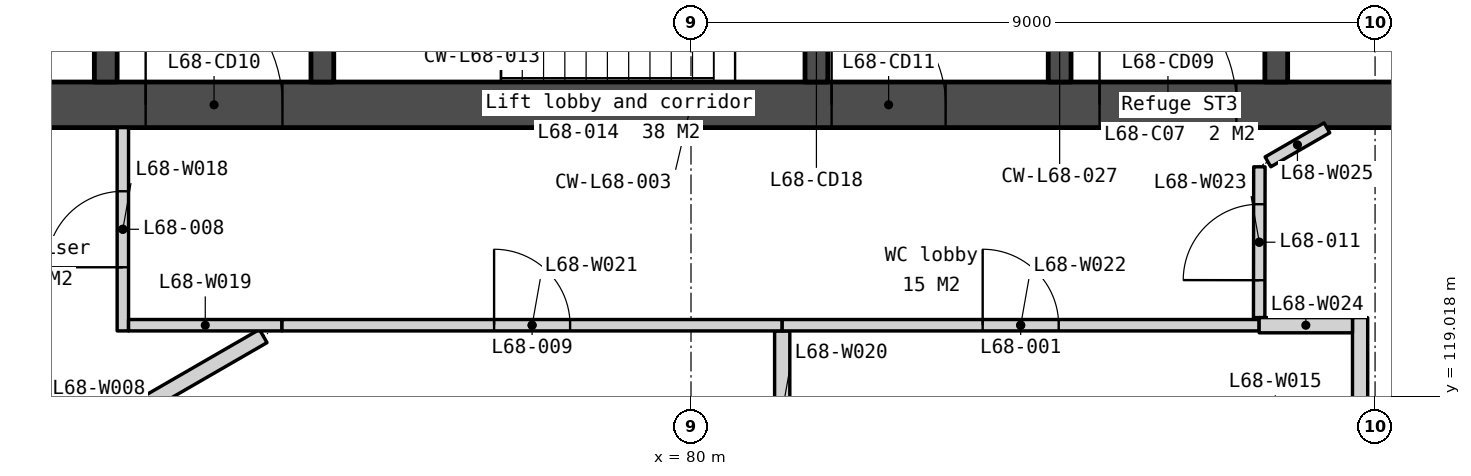
"""IFC4 building model, lengths in metres.
Left out: names, types, materials, properties, quantities, classifications, styles, units other than length and angle.
Written with IfcOpenShell. Run it as: python <this file> out.ifc"""

import sys

from ifc_helpers import new_model, si_unit, direction, frame, frame_2d, origin, place, context, subcontext, project, spatial, polyline, rectangle, outline, extrude, element, fill, save


model = new_model("IFC4")
c1 = context("Model", 3, precision=1e-05, world=origin(), true_north=direction((0.0, 1.0)))
c2 = subcontext(c1, "Body", "Model", "MODEL_VIEW")
j1 = project(units=[si_unit("LENGTHUNIT", "METRE"), si_unit("PLANEANGLEUNIT", "RADIAN")], contexts=[c1])
p1 = place(None, origin())
s1 = spatial("IfcSite", under=j1, at=p1, CompositionType="ELEMENT")
p2 = place(p1, origin())
s2 = spatial("IfcBuilding", under=s1, at=p2, CompositionType="ELEMENT")
p3 = place(p2, frame((0.0, 0.0, 277.7)))
s3 = spatial("IfcBuildingStorey", under=s2, at=p3, CompositionType="ELEMENT", Elevation=277.7)
p4 = place(p3, frame((69.0, 122.85, 0.0), z_axis=(0.0, 0.0, 1.0), x_axis=(1.0, 0.0, 0.0)))
e1 = element("IfcWall", 1, at=p4, inside=s3, PredefinedType="SOLIDWALL", context=c2, shape_type="SweptSolid", body=[
    extrude(rectangle(XDim=22.0, YDim=0.6, at=frame_2d((11.0, 0.0))), origin(), (0.0, 0.0, 1.0), 3.75),
])
p5 = place(p4, frame((16.375, 0.0, 0.0)))
e2 = element("IfcOpeningElement", 2, at=p5, cuts=e1, PredefinedType="OPENING", context=c2, shape_type="SweptSolid", body=[
    extrude(rectangle(XDim=1.8, YDim=2.1, at=frame_2d((0.9, 1.05))), frame((0.0, 0.31, 0.0), z_axis=(0.0, -1.0, 0.0), x_axis=(1.0, 0.0, 0.0)), (0.0, 0.0, 1.0), 0.62),
])
p6 = place(p4, frame((3.825, 0.0, 0.0)))
e3 = element("IfcOpeningElement", 3, at=p6, cuts=e1, PredefinedType="OPENING", context=c2, shape_type="SweptSolid", body=[
    extrude(rectangle(XDim=1.8, YDim=2.1, at=frame_2d((0.9, 1.05))), frame((0.0, 0.31, 0.0), z_axis=(0.0, -1.0, 0.0), x_axis=(1.0, 0.0, 0.0)), (0.0, 0.0, 1.0), 0.62),
])
p7 = place(p4, frame((12.85, 0.0, 0.0)))
e4 = element("IfcOpeningElement", 4, at=p7, cuts=e1, PredefinedType="OPENING", context=c2, shape_type="SweptSolid", body=[
    extrude(rectangle(XDim=1.5, YDim=2.1, at=frame_2d((0.75, 1.05))), frame((0.0, 0.31, 0.0), z_axis=(0.0, -1.0, 0.0), x_axis=(1.0, 0.0, 0.0)), (0.0, 0.0, 1.0), 0.62),
])
p8 = place(p3, frame((72.3, 133.95, 0.0), z_axis=(0.0, 0.0, 1.0), x_axis=(0.0, -1.0, 0.0)))
e5 = element("IfcWall", 5, at=p8, inside=s3, PredefinedType="SOLIDWALL", context=c2, shape_type="SweptSolid", body=[
    extrude(rectangle(XDim=10.8, YDim=0.3, at=frame_2d((5.4, 0.0))), origin(), (0.0, 0.0, 1.0), 3.75),
])
p9 = place(p8, frame((6.95, 0.0, 0.0)))
e6 = element("IfcOpeningElement", 6, at=p9, cuts=e5, PredefinedType="OPENING", context=c2, shape_type="SweptSolid", body=[
    extrude(rectangle(XDim=1.1, YDim=2.1, at=frame_2d((0.55, 1.05))), frame((0.0, 0.16, 0.0), z_axis=(0.0, -1.0, 0.0), x_axis=(1.0, 0.0, 0.0)), (0.0, 0.0, 1.0), 0.32),
])
p10 = place(p8, frame((9.35, 0.0, 0.0)))
e7 = element("IfcOpeningElement", 7, at=p10, cuts=e5, PredefinedType="OPENING", context=c2, shape_type="SweptSolid", body=[
    extrude(rectangle(XDim=0.9, YDim=2.1, at=frame_2d((0.45, 1.05))), frame((0.0, 0.16, 0.0), z_axis=(0.0, -1.0, 0.0), x_axis=(1.0, 0.0, 0.0)), (0.0, 0.0, 1.0), 0.32),
])
p11 = place(p8, frame((5.1, 0.0, 0.0)))
e8 = element("IfcOpeningElement", 8, at=p11, cuts=e5, PredefinedType="OPENING", context=c2, shape_type="SweptSolid", body=[
    extrude(rectangle(XDim=1.0, YDim=2.1, at=frame_2d((0.5, 1.05))), frame((0.0, 0.16, 0.0), z_axis=(0.0, -1.0, 0.0), x_axis=(1.0, 0.0, 0.0)), (0.0, 0.0, 1.0), 0.32),
])
p12 = place(p3, frame((75.15, 125.7, 0.0), z_axis=(0.0, 0.0, 1.0), x_axis=(0.0, -1.0, 0.0)))
e9 = element("IfcWall", 9, at=p12, inside=s3, PredefinedType="SOLIDWALL", context=c2, shape_type="SweptSolid", body=[
    extrude(rectangle(XDim=2.55, YDim=0.3, at=frame_2d((1.275, 0.0))), origin(), (0.0, 0.0, 1.0), 3.75),
])
p13 = place(p3, frame((81.65, 125.7, 0.0), z_axis=(0.0, 0.0, 1.0), x_axis=(0.0, -1.0, 0.0)))
e10 = element("IfcWall", 10, at=p13, inside=s3, PredefinedType="SOLIDWALL", context=c2, shape_type="SweptSolid", body=[
    extrude(rectangle(XDim=2.55, YDim=0.3, at=frame_2d((1.275, 0.0))), origin(), (0.0, 0.0, 1.0), 3.75),
])
p14 = place(p13, frame((0.75, 0.0, 0.0)))
e11 = element("IfcOpeningElement", 11, at=p14, cuts=e10, PredefinedType="OPENING", context=c2, shape_type="SweptSolid", body=[
    extrude(rectangle(XDim=1.0, YDim=2.1, at=frame_2d((0.5, 1.05))), frame((0.0, 0.16, 0.0), z_axis=(0.0, -1.0, 0.0), x_axis=(1.0, 0.0, 0.0)), (0.0, 0.0, 1.0), 0.32),
])
p15 = place(p3, frame((84.85, 125.85, 0.0), z_axis=(0.0, 0.0, 1.0), x_axis=(0.0, -1.0, 0.0)))
e12 = element("IfcWall", 12, at=p15, inside=s3, PredefinedType="SOLIDWALL", context=c2, shape_type="SweptSolid", body=[
    extrude(rectangle(XDim=2.7, YDim=0.3, at=frame_2d((1.35, 0.0))), origin(), (0.0, 0.0, 1.0), 3.75),
])
p16 = place(p3, frame((87.7, 133.95, 0.0), z_axis=(0.0, 0.0, 1.0), x_axis=(0.0, -1.0, 0.0)))
e13 = element("IfcWall", 13, at=p16, inside=s3, PredefinedType="SOLIDWALL", context=c2, shape_type="SweptSolid", body=[
    extrude(rectangle(XDim=10.8, YDim=0.3, at=frame_2d((5.4, 0.0))), origin(), (0.0, 0.0, 1.0), 3.75),
])
p17 = place(p16, frame((6.95, 0.0, 0.0)))
e14 = element("IfcOpeningElement", 14, at=p17, cuts=e13, PredefinedType="OPENING", context=c2, shape_type="SweptSolid", body=[
    extrude(rectangle(XDim=1.1, YDim=2.1, at=frame_2d((0.55, 1.05))), frame((0.0, 0.16, 0.0), z_axis=(0.0, -1.0, 0.0), x_axis=(1.0, 0.0, 0.0)), (0.0, 0.0, 1.0), 0.32),
])
p18 = place(p16, frame((5.1, 0.0, 0.0)))
e15 = element("IfcOpeningElement", 15, at=p18, cuts=e13, PredefinedType="OPENING", context=c2, shape_type="SweptSolid", body=[
    extrude(rectangle(XDim=1.0, YDim=2.1, at=frame_2d((0.5, 1.05))), frame((0.0, 0.16, 0.0), z_axis=(0.0, -1.0, 0.0), x_axis=(1.0, 0.0, 0.0)), (0.0, 0.0, 1.0), 0.32),
])
p19 = place(p16, frame((9.25, 0.0, 0.0)))
e16 = element("IfcOpeningElement", 16, at=p19, cuts=e13, PredefinedType="OPENING", context=c2, shape_type="SweptSolid", body=[
    extrude(rectangle(XDim=1.1, YDim=2.1, at=frame_2d((0.55, 1.05))), frame((0.0, 0.16, 0.0), z_axis=(0.0, -1.0, 0.0), x_axis=(1.0, 0.0, 0.0)), (0.0, 0.0, 1.0), 0.32),
])
p20 = place(p3, frame((60.609, 133.207, -0.15), z_axis=(0.0, 0.0, 1.0), x_axis=(0.500002536638, -0.866023939251, 0.0)))
e17 = element("IfcWall", 17, at=p20, inside=s3, PredefinedType="SOLIDWALL", context=c2, shape_type="SweptSolid", body=[
    extrude(outline(polyline([(36.972, 0.0), (36.972, 3.9), (0.0, 3.9), (0.0, 0.0), (36.972, 0.0)])), frame((0.0, 0.225, 0.0), z_axis=(0.0, -1.0, 0.0), x_axis=(1.0, 0.0, 0.0)), (0.0, 0.0, 1.0), 0.45),
])
p21 = place(p20, frame((0.744, 0.0, 0.95)))
e18 = element("IfcOpeningElement", 18, at=p21, cuts=e17, PredefinedType="OPENING", context=c2, shape_type="SweptSolid", body=[
    extrude(rectangle(XDim=1.2, YDim=2.2, at=frame_2d((0.6, 1.1))), frame((0.0, 0.235, 0.0), z_axis=(0.0, -1.0, 0.0), x_axis=(1.0, 0.0, 0.0)), (0.0, 0.0, 1.0), 0.47),
])
p22 = place(p20, frame((7.793, 0.0, 0.95)))
e19 = element("IfcOpeningElement", 19, at=p22, cuts=e17, PredefinedType="OPENING", context=c2, shape_type="SweptSolid", body=[
    extrude(rectangle(XDim=1.2, YDim=2.2, at=frame_2d((0.6, 1.1))), frame((0.0, 0.235, 0.0), z_axis=(0.0, -1.0, 0.0), x_axis=(1.0, 0.0, 0.0)), (0.0, 0.0, 1.0), 0.47),
])
p23 = place(p20, frame((9.493, 0.0, 0.95)))
e20 = element("IfcOpeningElement", 20, at=p23, cuts=e17, PredefinedType="OPENING", context=c2, shape_type="SweptSolid", body=[
    extrude(rectangle(XDim=1.2, YDim=2.2, at=frame_2d((0.6, 1.1))), frame((0.0, 0.235, 0.0), z_axis=(0.0, -1.0, 0.0), x_axis=(1.0, 0.0, 0.0)), (0.0, 0.0, 1.0), 0.47),
])
p24 = place(p20, frame((17.036, 0.0, 0.95)))
e21 = element("IfcOpeningElement", 21, at=p24, cuts=e17, PredefinedType="OPENING", context=c2, shape_type="SweptSolid", body=[
    extrude(rectangle(XDim=1.2, YDim=2.2, at=frame_2d((0.6, 1.1))), frame((0.0, 0.235, 0.0), z_axis=(0.0, -1.0, 0.0), x_axis=(1.0, 0.0, 0.0)), (0.0, 0.0, 1.0), 0.47),
])
p25 = place(p20, frame((18.736, 0.0, 0.95)))
e22 = element("IfcOpeningElement", 22, at=p25, cuts=e17, PredefinedType="OPENING", context=c2, shape_type="SweptSolid", body=[
    extrude(rectangle(XDim=1.2, YDim=2.2, at=frame_2d((0.6, 1.1))), frame((0.0, 0.235, 0.0), z_axis=(0.0, -1.0, 0.0), x_axis=(1.0, 0.0, 0.0)), (0.0, 0.0, 1.0), 0.47),
])
p26 = place(p20, frame((26.279, 0.0, 0.95)))
e23 = element("IfcOpeningElement", 23, at=p26, cuts=e17, PredefinedType="OPENING", context=c2, shape_type="SweptSolid", body=[
    extrude(rectangle(XDim=1.2, YDim=2.2, at=frame_2d((0.6, 1.1))), frame((0.0, 0.235, 0.0), z_axis=(0.0, -1.0, 0.0), x_axis=(1.0, 0.0, 0.0)), (0.0, 0.0, 1.0), 0.47),
])
p27 = place(p20, frame((27.979, 0.0, 0.95)))
e24 = element("IfcOpeningElement", 24, at=p27, cuts=e17, PredefinedType="OPENING", context=c2, shape_type="SweptSolid", body=[
    extrude(rectangle(XDim=1.2, YDim=2.2, at=frame_2d((0.6, 1.1))), frame((0.0, 0.235, 0.0), z_axis=(0.0, -1.0, 0.0), x_axis=(1.0, 0.0, 0.0)), (0.0, 0.0, 1.0), 0.47),
])
p28 = place(p20, frame((35.028, 0.0, 0.95)))
e25 = element("IfcOpeningElement", 25, at=p28, cuts=e17, PredefinedType="OPENING", context=c2, shape_type="SweptSolid", body=[
    extrude(rectangle(XDim=1.2, YDim=2.2, at=frame_2d((0.6, 1.1))), frame((0.0, 0.235, 0.0), z_axis=(0.0, -1.0, 0.0), x_axis=(1.0, 0.0, 0.0)), (0.0, 0.0, 1.0), 0.47),
])
p29 = place(p3, frame((86.427, 110.752, -0.15), z_axis=(0.0, 0.0, 1.0), x_axis=(0.500000383388, 0.866025182435, 0.0)))
e26 = element("IfcWall", 26, at=p29, inside=s3, PredefinedType="SOLIDWALL", context=c2, shape_type="SweptSolid", body=[
    extrude(outline(polyline([(25.929, 3.9), (25.929, 0.0), (0.0, 0.0), (0.0, 3.9), (25.929, 3.9)])), frame((0.0, 0.225, 0.0), z_axis=(0.0, -1.0, 0.0), x_axis=(1.0, 0.0, 0.0)), (0.0, 0.0, 1.0), 0.45),
])
p30 = place(p29, frame((5.993, 0.0, 0.95)))
e27 = element("IfcOpeningElement", 27, at=p30, cuts=e26, PredefinedType="OPENING", context=c2, shape_type="SweptSolid", body=[
    extrude(rectangle(XDim=1.2, YDim=2.2, at=frame_2d((0.6, 1.1))), frame((0.0, 0.235, 0.0), z_axis=(0.0, -1.0, 0.0), x_axis=(1.0, 0.0, 0.0)), (0.0, 0.0, 1.0), 0.47),
])
p31 = place(p29, frame((7.693, 0.0, 0.95)))
e28 = element("IfcOpeningElement", 28, at=p31, cuts=e26, PredefinedType="OPENING", context=c2, shape_type="SweptSolid", body=[
    extrude(rectangle(XDim=1.2, YDim=2.2, at=frame_2d((0.6, 1.1))), frame((0.0, 0.235, 0.0), z_axis=(0.0, -1.0, 0.0), x_axis=(1.0, 0.0, 0.0)), (0.0, 0.0, 1.0), 0.47),
])
p32 = place(p29, frame((15.236, 0.0, 0.95)))
e29 = element("IfcOpeningElement", 29, at=p32, cuts=e26, PredefinedType="OPENING", context=c2, shape_type="SweptSolid", body=[
    extrude(rectangle(XDim=1.2, YDim=2.2, at=frame_2d((0.6, 1.1))), frame((0.0, 0.235, 0.0), z_axis=(0.0, -1.0, 0.0), x_axis=(1.0, 0.0, 0.0)), (0.0, 0.0, 1.0), 0.47),
])
p33 = place(p29, frame((16.936, 0.0, 0.95)))
e30 = element("IfcOpeningElement", 30, at=p33, cuts=e26, PredefinedType="OPENING", context=c2, shape_type="SweptSolid", body=[
    extrude(rectangle(XDim=1.2, YDim=2.2, at=frame_2d((0.6, 1.1))), frame((0.0, 0.235, 0.0), z_axis=(0.0, -1.0, 0.0), x_axis=(1.0, 0.0, 0.0)), (0.0, 0.0, 1.0), 0.47),
])
p34 = place(p29, frame((23.985, 0.0, 0.95)))
e31 = element("IfcOpeningElement", 31, at=p34, cuts=e26, PredefinedType="OPENING", context=c2, shape_type="SweptSolid", body=[
    extrude(rectangle(XDim=1.2, YDim=2.2, at=frame_2d((0.6, 1.1))), frame((0.0, 0.235, 0.0), z_axis=(0.0, -1.0, 0.0), x_axis=(1.0, 0.0, 0.0)), (0.0, 0.0, 1.0), 0.47),
])
p35 = place(p3, frame((70.047, 117.31, 0.0), z_axis=(0.0, 0.0, 1.0), x_axis=(0.866032544947, 0.499987630939, 0.0)))
e32 = element("IfcWall", 32, at=p35, inside=s3, PredefinedType="PARTITIONING", context=c2, shape_type="SweptSolid", body=[
    extrude(rectangle(XDim=4.994, YDim=0.2, at=frame_2d((2.497, 0.0))), origin(), (0.0, 0.0, 1.0), 3.75),
])
p36 = place(p3, frame((88.803, 120.05, 0.0), z_axis=(0.0, 0.0, 1.0), x_axis=(0.0, -1.0, 0.0)))
e33 = element("IfcWall", 33, at=p36, inside=s3, PredefinedType="PARTITIONING", context=c2, shape_type="SweptSolid", body=[
    extrude(rectangle(XDim=2.3, YDim=0.2, at=frame_2d((1.15, 0.0))), origin(), (0.0, 0.0, 1.0), 3.062),
])
p37 = place(p3, frame((72.525, 119.875, 0.0), z_axis=(0.0, 0.0, 1.0), x_axis=(0.0, 1.0, 0.0)))
e34 = element("IfcWall", 34, at=p37, inside=s3, PredefinedType="PARTITIONING", context=c2, shape_type="SweptSolid", body=[
    extrude(rectangle(XDim=2.675, YDim=0.15, at=frame_2d((1.337, 0.0))), origin(), (0.0, 0.0, 1.0), 3.75),
])
p38 = place(p37, frame((0.837, 0.0, 0.0)))
e35 = element("IfcOpeningElement", 35, at=p38, cuts=e34, PredefinedType="OPENING", context=c2, shape_type="SweptSolid", body=[
    extrude(rectangle(XDim=1.0, YDim=2.1, at=frame_2d((0.5, 1.05))), frame((0.0, 0.085, 0.0), z_axis=(0.0, -1.0, 0.0), x_axis=(1.0, 0.0, 0.0)), (0.0, 0.0, 1.0), 0.17),
])
p39 = place(p3, frame((72.6, 119.95, 0.0), z_axis=(0.0, 0.0, 1.0), x_axis=(1.0, 0.0, 0.0)))
e36 = element("IfcWall", 36, at=p39, inside=s3, PredefinedType="PARTITIONING", context=c2, shape_type="SweptSolid", body=[
    extrude(rectangle(XDim=2.019, YDim=0.15, at=frame_2d((1.009, 0.0))), origin(), (0.0, 0.0, 1.0), 3.75),
])
p40 = place(p3, frame((81.2, 117.75, 0.0), z_axis=(0.0, 0.0, 1.0), x_axis=(0.0, 1.0, 0.0)))
e37 = element("IfcWall", 37, at=p40, inside=s3, PredefinedType="PARTITIONING", context=c2, shape_type="SweptSolid", body=[
    extrude(rectangle(XDim=2.125, YDim=0.2, at=frame_2d((1.062, 0.0))), origin(), (0.0, 0.0, 1.0), 3.75),
])
p41 = place(p3, frame((74.619, 119.95, 0.0), z_axis=(0.0, 0.0, 1.0), x_axis=(1.0, 0.0, 0.0)))
e38 = element("IfcWall", 38, at=p41, inside=s3, PredefinedType="PARTITIONING", context=c2, shape_type="SweptSolid", body=[
    extrude(rectangle(XDim=6.581, YDim=0.15, at=frame_2d((3.291, 0.0))), origin(), (0.0, 0.0, 1.0), 3.75),
])
p42 = place(p41, frame((2.791, 0.0, 0.0)))
e39 = element("IfcOpeningElement", 39, at=p42, cuts=e38, PredefinedType="OPENING", context=c2, shape_type="SweptSolid", body=[
    extrude(rectangle(XDim=1.0, YDim=2.1, at=frame_2d((0.5, 1.05))), frame((0.0, 0.085, 0.0), z_axis=(0.0, -1.0, 0.0), x_axis=(1.0, 0.0, 0.0)), (0.0, 0.0, 1.0), 0.17),
])
p43 = place(p3, frame((81.2, 119.95, 0.0), z_axis=(0.0, 0.0, 1.0), x_axis=(1.0, 0.0, 0.0)))
e40 = element("IfcWall", 40, at=p43, inside=s3, PredefinedType="PARTITIONING", context=c2, shape_type="SweptSolid", body=[
    extrude(rectangle(XDim=6.275, YDim=0.15, at=frame_2d((3.137, 0.0))), origin(), (0.0, 0.0, 1.0), 3.75),
])
p44 = place(p43, frame((2.637, 0.0, 0.0)))
e41 = element("IfcOpeningElement", 41, at=p44, cuts=e40, PredefinedType="OPENING", context=c2, shape_type="SweptSolid", body=[
    extrude(rectangle(XDim=1.0, YDim=2.1, at=frame_2d((0.5, 1.05))), frame((0.0, 0.085, 0.0), z_axis=(0.0, -1.0, 0.0), x_axis=(1.0, 0.0, 0.0)), (0.0, 0.0, 1.0), 0.17),
])
p45 = place(p3, frame((87.475, 120.05, 0.0), z_axis=(0.0, 0.0, 1.0), x_axis=(0.001476558006, 0.999998909888, 0.0)))
e42 = element("IfcWall", 42, at=p45, inside=s3, PredefinedType="PARTITIONING", context=c2, shape_type="SweptSolid", body=[
    extrude(rectangle(XDim=1.984, YDim=0.15, at=frame_2d((0.992, 0.0))), origin(), (0.0, 0.0, 1.0), 3.75),
])
p46 = place(p45, frame((0.492, 0.0, 0.0)))
e43 = element("IfcOpeningElement", 43, at=p46, cuts=e42, PredefinedType="OPENING", context=c2, shape_type="SweptSolid", body=[
    extrude(rectangle(XDim=1.0, YDim=2.1, at=frame_2d((0.5, 1.05))), frame((0.0, 0.085, 0.0), z_axis=(0.0, -1.0, 0.0), x_axis=(1.0, 0.0, 0.0)), (0.0, 0.0, 1.0), 0.17),
])
p47 = place(p3, frame((87.475, 119.95, 0.0), z_axis=(0.0, 0.0, 1.0), x_axis=(1.0, 0.0, 0.0)))
e44 = element("IfcWall", 44, at=p47, inside=s3, PredefinedType="PARTITIONING", context=c2, shape_type="SweptSolid", body=[
    extrude(rectangle(XDim=1.228, YDim=0.2, at=frame_2d((0.614, 0.0))), origin(), (0.0, 0.0, 1.0), 3.75),
])
p48 = place(p3, frame((87.591, 122.099, 0.0), z_axis=(0.0, 0.0, 1.0), x_axis=(0.866072174983, 0.499918981156, 0.0)))
e45 = element("IfcWall", 45, at=p48, inside=s3, PredefinedType="PARTITIONING", context=c2, shape_type="SweptSolid", body=[
    extrude(rectangle(XDim=0.896, YDim=0.15, at=frame_2d((0.448, 0.0))), origin(), (0.0, 0.0, 1.0), 3.75),
])
p49 = place(p5, origin())
e46 = element("IfcDoor", 46, at=p49, inside=s3, OperationType="DOUBLE_DOOR_DOUBLE_SWING", PredefinedType="DOOR", context=c2, shape_type="SweptSolid", body=[
    extrude(rectangle(XDim=1.8, YDim=2.1, at=frame_2d((0.9, 1.05))), frame((0.0, 0.025, 0.0), z_axis=(0.0, -1.0, 0.0), x_axis=(1.0, 0.0, 0.0)), (0.0, 0.0, 1.0), 0.05),
])
fill(e2, e46)
p50 = place(p6, origin())
e47 = element("IfcDoor", 47, at=p50, inside=s3, OperationType="DOUBLE_DOOR_DOUBLE_SWING", PredefinedType="DOOR", context=c2, shape_type="SweptSolid", body=[
    extrude(rectangle(XDim=1.8, YDim=2.1, at=frame_2d((0.9, 1.05))), frame((0.0, 0.025, 0.0), z_axis=(0.0, -1.0, 0.0), x_axis=(1.0, 0.0, 0.0)), (0.0, 0.0, 1.0), 0.05),
])
fill(e3, e47)
p51 = place(p7, origin())
e48 = element("IfcDoor", 48, at=p51, inside=s3, OperationType="DOUBLE_DOOR_DOUBLE_SWING", PredefinedType="DOOR", context=c2, shape_type="SweptSolid", body=[
    extrude(rectangle(XDim=1.5, YDim=2.1, at=frame_2d((0.75, 1.05))), frame((0.0, 0.025, 0.0), z_axis=(0.0, -1.0, 0.0), x_axis=(1.0, 0.0, 0.0)), (0.0, 0.0, 1.0), 0.05),
])
fill(e4, e48)
p52 = place(p44, origin())
e49 = element("IfcDoor", 49, at=p52, inside=s3, OperationType="SINGLE_SWING_LEFT", PredefinedType="DOOR", context=c2, shape_type="SweptSolid", body=[
    extrude(rectangle(XDim=1.0, YDim=2.1, at=frame_2d((0.5, 1.05))), frame((0.0, 0.025, 0.0), z_axis=(0.0, -1.0, 0.0), x_axis=(1.0, 0.0, 0.0)), (0.0, 0.0, 1.0), 0.05),
])
fill(e41, e49)
p53 = place(p38, origin())
e50 = element("IfcDoor", 50, at=p53, inside=s3, OperationType="SINGLE_SWING_LEFT", PredefinedType="DOOR", context=c2, shape_type="SweptSolid", body=[
    extrude(rectangle(XDim=1.0, YDim=2.1, at=frame_2d((0.5, 1.05))), frame((0.0, 0.025, 0.0), z_axis=(0.0, -1.0, 0.0), x_axis=(1.0, 0.0, 0.0)), (0.0, 0.0, 1.0), 0.05),
])
fill(e35, e50)
p54 = place(p42, origin())
e51 = element("IfcDoor", 51, at=p54, inside=s3, OperationType="SINGLE_SWING_LEFT", PredefinedType="DOOR", context=c2, shape_type="SweptSolid", body=[
    extrude(rectangle(XDim=1.0, YDim=2.1, at=frame_2d((0.5, 1.05))), frame((0.0, 0.025, 0.0), z_axis=(0.0, -1.0, 0.0), x_axis=(1.0, 0.0, 0.0)), (0.0, 0.0, 1.0), 0.05),
])
fill(e39, e51)
p55 = place(p46, origin())
e52 = element("IfcDoor", 52, at=p55, inside=s3, OperationType="SINGLE_SWING_LEFT", PredefinedType="DOOR", context=c2, shape_type="SweptSolid", body=[
    extrude(rectangle(XDim=1.0, YDim=2.1, at=frame_2d((0.5, 1.05))), frame((0.0, 0.025, 0.0), z_axis=(0.0, -1.0, 0.0), x_axis=(1.0, 0.0, 0.0)), (0.0, 0.0, 1.0), 0.05),
])
fill(e43, e52)
save(model, sys.argv[1])
